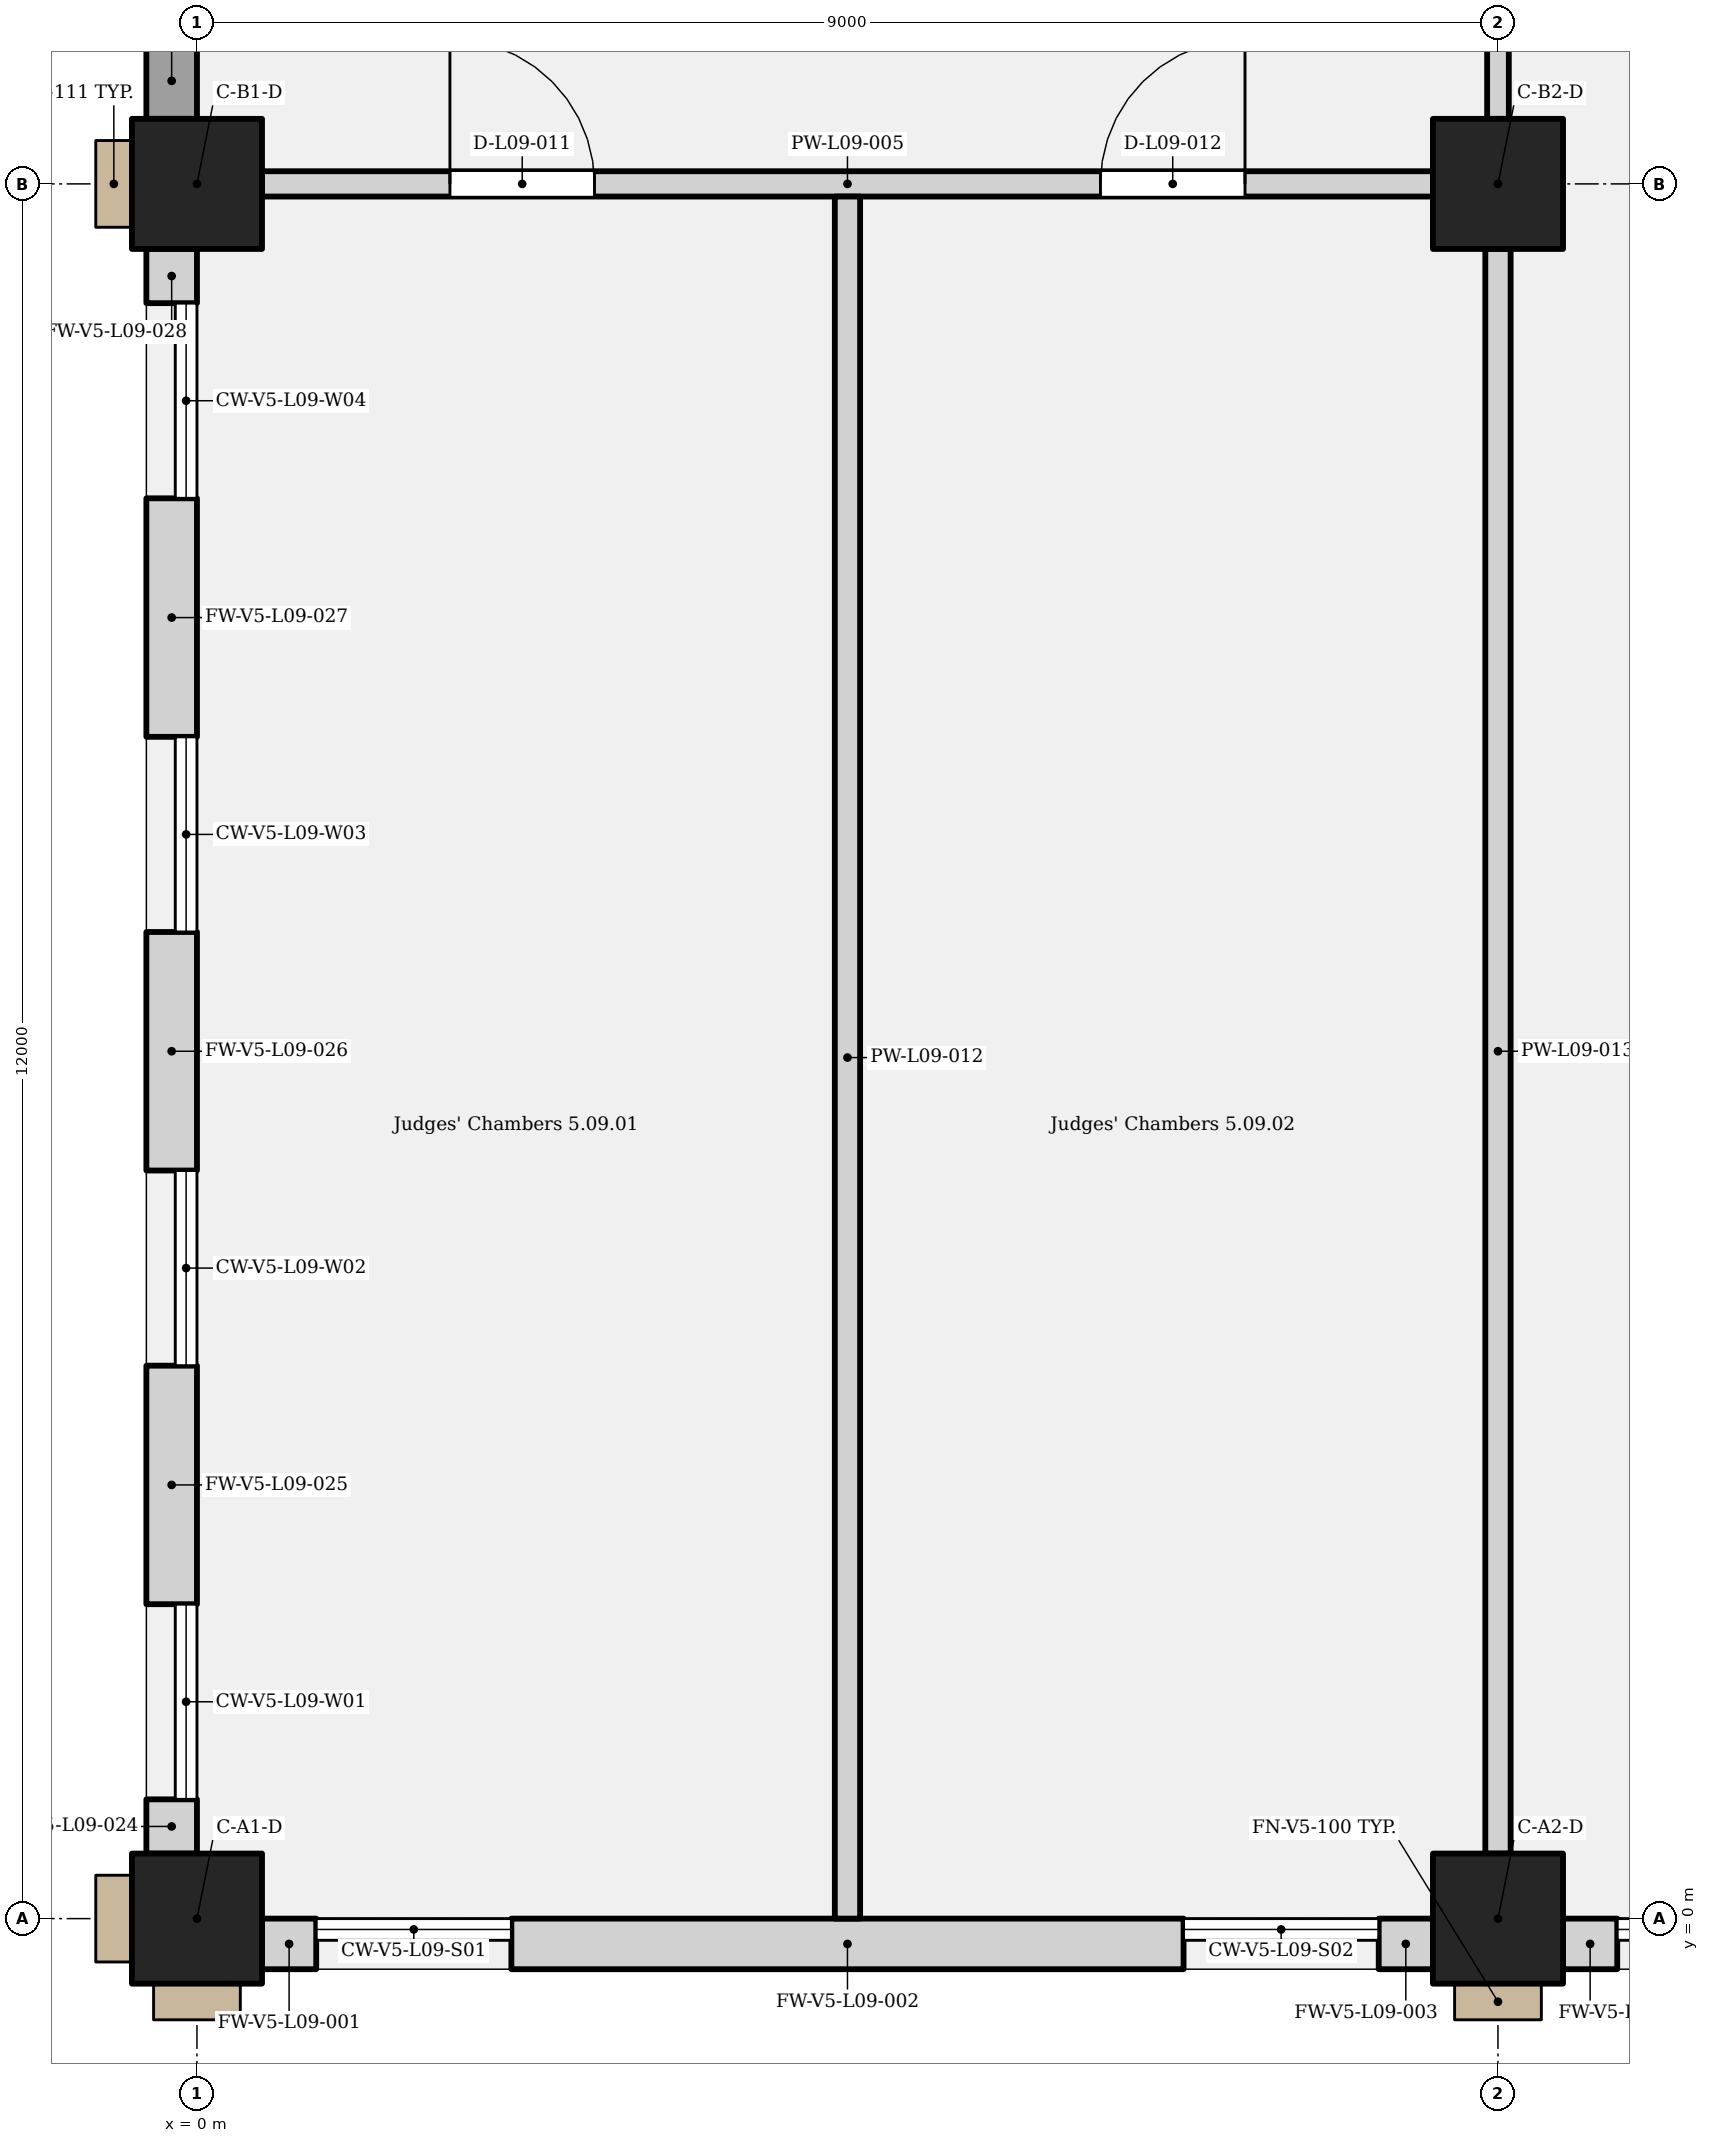
"""IFC4 building model, lengths in metres.
Left out: names, types, materials, properties, quantities, classifications, styles, units other than length and angle.
Written with IfcOpenShell. Run it as: python <this file> out.ifc"""

import sys

from ifc_helpers import new_model, si_unit, direction, frame, frame_2d, origin, origin_2d, place, context, subcontext, project, spatial, rectangle, extrude, element, fill, save


model = new_model("IFC4")
c1 = context("Model", 3, precision=1e-05, world=origin(), true_north=direction((0.0, 1.0)))
c2 = subcontext(c1, "Body", "Model", "MODEL_VIEW")
j1 = project(units=[si_unit("LENGTHUNIT", "METRE"), si_unit("PLANEANGLEUNIT", "RADIAN")], contexts=[c1])
p1 = place(None, origin())
s1 = spatial("IfcSite", under=j1, at=p1, CompositionType="ELEMENT")
p2 = place(p1, origin())
s2 = spatial("IfcBuilding", under=s1, at=p2, CompositionType="ELEMENT")
p3 = place(p2, frame((0.0, 0.0, 48.9)))
s3 = spatial("IfcBuildingStorey", under=s2, at=p3, CompositionType="ELEMENT", Elevation=48.9)
for number, where, z_axis, x_axis in (
    (1, (0.0, 0.0, 0.0), (0.0, 0.0, 1.0), (1.0, 0.0, 0.0)),
    (2, (9.0, 0.0, 0.0), (0.0, 0.0, 1.0), (1.0, 0.0, 0.0)),
    (3, (0.0, 12.0, 0.0), (0.0, 0.0, 1.0), (1.0, 0.0, 0.0)),
    (4, (9.0, 12.0, 0.0), (0.0, 0.0, 1.0), (1.0, 0.0, 0.0)),
):
    element("IfcColumn", number, at=place(p3, frame(where, z_axis=z_axis, x_axis=x_axis)), inside=s3, PredefinedType="COLUMN", context=c2, shape_type="SweptSolid", body=[
        extrude(rectangle(XDim=0.9, YDim=0.9, at=origin_2d()), origin(), (0.0, 0.0, 1.0), 4.5),
    ])
p4 = place(p3, frame((0.45, -0.175, 0.0), z_axis=(0.0, 0.0, 1.0), x_axis=(1.0, 0.0, 0.0)))
e5 = element("IfcWall", 5, at=p4, inside=s3, PredefinedType="SOLIDWALL", context=c2, shape_type="SweptSolid", body=[
    extrude(rectangle(XDim=0.375, YDim=0.35, at=frame_2d((0.188, 0.0))), origin(), (0.0, 0.0, 1.0), 4.25),
])
p5 = place(p3, frame((2.175, -0.175, 0.0), z_axis=(0.0, 0.0, 1.0), x_axis=(1.0, 0.0, 0.0)))
e6 = element("IfcWall", 6, at=p5, inside=s3, PredefinedType="SOLIDWALL", context=c2, shape_type="SweptSolid", body=[
    extrude(rectangle(XDim=4.65, YDim=0.35, at=frame_2d((2.325, 0.0))), origin(), (0.0, 0.0, 1.0), 4.25),
])
for number, where, z_axis, x_axis in (
    (7, (8.175, -0.175, 0.0), (0.0, 0.0, 1.0), (1.0, 0.0, 0.0)),
    (8, (9.45, -0.175, 0.0), (0.0, 0.0, 1.0), (1.0, 0.0, 0.0)),
    (9, (-0.175, 0.45, 0.0), (0.0, 0.0, 1.0), (0.0, 1.0, 0.0)),
):
    element("IfcWall", number, at=place(p3, frame(where, z_axis=z_axis, x_axis=x_axis)), inside=s3, PredefinedType="SOLIDWALL", context=c2, shape_type="SweptSolid", body=[
        extrude(rectangle(XDim=0.375, YDim=0.35, at=frame_2d((0.188, 0.0))), origin(), (0.0, 0.0, 1.0), 4.25),
    ])
for number, where, z_axis, x_axis in (
    (10, (-0.175, 2.175, 0.0), (0.0, 0.0, 1.0), (0.0, 1.0, 0.0)),
    (11, (-0.175, 5.175, 0.0), (0.0, 0.0, 1.0), (0.0, 1.0, 0.0)),
    (12, (-0.175, 8.175, 0.0), (0.0, 0.0, 1.0), (0.0, 1.0, 0.0)),
):
    element("IfcWall", number, at=place(p3, frame(where, z_axis=z_axis, x_axis=x_axis)), inside=s3, PredefinedType="SOLIDWALL", context=c2, shape_type="SweptSolid", body=[
        extrude(rectangle(XDim=1.65, YDim=0.35, at=frame_2d((0.825, 0.0))), origin(), (0.0, 0.0, 1.0), 4.25),
    ])
p6 = place(p3, frame((-0.175, 11.175, 0.0), z_axis=(0.0, 0.0, 1.0), x_axis=(0.0, 1.0, 0.0)))
e13 = element("IfcWall", 13, at=p6, inside=s3, PredefinedType="SOLIDWALL", context=c2, shape_type="SweptSolid", body=[
    extrude(rectangle(XDim=0.375, YDim=0.35, at=frame_2d((0.188, 0.0))), origin(), (0.0, 0.0, 1.0), 4.25),
])
p7 = place(p3, frame((-0.175, 12.45, 0.0), z_axis=(0.0, 0.0, 1.0), x_axis=(0.0, 1.0, 0.0)))
e14 = element("IfcWall", 14, at=p7, inside=s3, PredefinedType="SOLIDWALL", context=c2, shape_type="SweptSolid", body=[
    extrude(rectangle(XDim=0.525, YDim=0.35, at=frame_2d((0.263, 0.0))), origin(), (0.0, 0.0, 1.0), 4.25),
])
p8 = place(p3, frame((0.45, 12.0, 0.0), z_axis=(0.0, 0.0, 1.0), x_axis=(1.0, 0.0, 0.0)))
e15 = element("IfcWall", 15, at=p8, inside=s3, PredefinedType="PARTITIONING", context=c2, shape_type="SweptSolid", body=[
    extrude(rectangle(XDim=8.1, YDim=0.175, at=frame_2d((4.05, 0.0))), origin(), (0.0, 0.0, 1.0), 3.5),
])
p9 = place(p8, frame((1.3, 0.0, 0.0)))
e16 = element("IfcOpeningElement", 16, at=p9, cuts=e15, PredefinedType="OPENING", context=c2, shape_type="SweptSolid", body=[
    extrude(rectangle(XDim=1.0, YDim=2.1, at=frame_2d((0.5, 1.05))), frame((0.0, 0.097, 0.0), z_axis=(0.0, -1.0, 0.0), x_axis=(1.0, 0.0, 0.0)), (0.0, 0.0, 1.0), 0.195),
])
p10 = place(p8, frame((5.8, 0.0, 0.0)))
e17 = element("IfcOpeningElement", 17, at=p10, cuts=e15, PredefinedType="OPENING", context=c2, shape_type="SweptSolid", body=[
    extrude(rectangle(XDim=1.0, YDim=2.1, at=frame_2d((0.5, 1.05))), frame((0.0, 0.097, 0.0), z_axis=(0.0, -1.0, 0.0), x_axis=(1.0, 0.0, 0.0)), (0.0, 0.0, 1.0), 0.195),
])
p11 = place(p3, frame((4.5, 0.0, 0.0), z_axis=(0.0, 0.0, 1.0), x_axis=(0.0, 1.0, 0.0)))
e18 = element("IfcWall", 18, at=p11, inside=s3, PredefinedType="PARTITIONING", context=c2, shape_type="SweptSolid", body=[
    extrude(rectangle(XDim=11.913, YDim=0.175, at=frame_2d((5.956, 0.0))), origin(), (0.0, 0.0, 1.0), 4.25),
])
p12 = place(p3, frame((9.0, 0.45, 0.0), z_axis=(0.0, 0.0, 1.0), x_axis=(0.0, 1.0, 0.0)))
e19 = element("IfcWall", 19, at=p12, inside=s3, PredefinedType="PARTITIONING", context=c2, shape_type="SweptSolid", body=[
    extrude(rectangle(XDim=11.1, YDim=0.175, at=frame_2d((5.55, 0.0))), origin(), (0.0, 0.0, 1.0), 3.5),
])
p13 = place(p3, frame((9.0, 12.45, 0.0), z_axis=(0.0, 0.0, 1.0), x_axis=(0.0, 1.0, 0.0)))
e20 = element("IfcWall", 20, at=p13, inside=s3, PredefinedType="PARTITIONING", context=c2, shape_type="SweptSolid", body=[
    extrude(rectangle(XDim=4.575, YDim=0.15, at=frame_2d((2.288, 0.0))), origin(), (0.0, 0.0, 1.0), 3.3),
])
p14 = place(p9, origin())
e21 = element("IfcDoor", 21, at=p14, inside=s3, OperationType="SINGLE_SWING_LEFT", PredefinedType="DOOR", context=c2, shape_type="SweptSolid", body=[
    extrude(rectangle(XDim=1.0, YDim=2.1, at=frame_2d((0.5, 1.05))), frame((0.0, 0.025, 0.0), z_axis=(0.0, -1.0, 0.0), x_axis=(1.0, 0.0, 0.0)), (0.0, 0.0, 1.0), 0.05),
])
fill(e16, e21)
p15 = place(p10, origin())
e22 = element("IfcDoor", 22, at=p15, inside=s3, OperationType="SINGLE_SWING_RIGHT", PredefinedType="DOOR", context=c2, shape_type="SweptSolid", body=[
    extrude(rectangle(XDim=1.0, YDim=2.1, at=frame_2d((0.5, 1.05))), frame((0.0, 0.025, 0.0), z_axis=(0.0, -1.0, 0.0), x_axis=(1.0, 0.0, 0.0)), (0.0, 0.0, 1.0), 0.05),
])
fill(e17, e22)
save(model, sys.argv[1])
